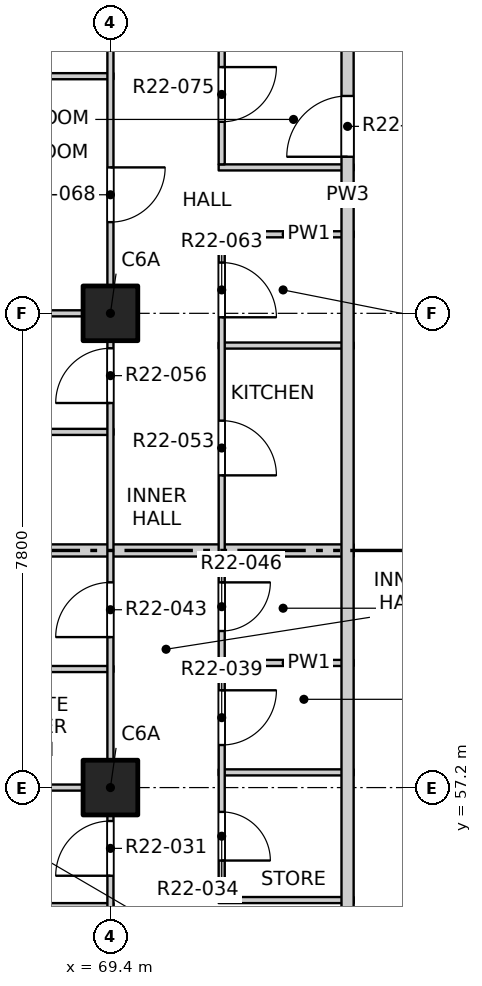
"""IFC4 building model, lengths in metres.
Left out: names, types, materials, properties, quantities, classifications, styles, units other than length and angle.
Written with IfcOpenShell. Run it as: python <this file> out.ifc"""

import sys

from ifc_helpers import new_model, si_unit, direction, frame, frame_2d, origin, origin_2d, place, context, subcontext, project, spatial, rectangle, extrude, element, fill, save


model = new_model("IFC4")
c1 = context("Model", 3, precision=1e-05, world=origin(), true_north=direction((0.0, 1.0)))
c2 = subcontext(c1, "Body", "Model", "MODEL_VIEW")
j1 = project(units=[si_unit("LENGTHUNIT", "METRE"), si_unit("PLANEANGLEUNIT", "RADIAN")], contexts=[c1])
p1 = place(None, origin())
s1 = spatial("IfcSite", under=j1, at=p1, CompositionType="ELEMENT")
p2 = place(p1, origin())
s2 = spatial("IfcBuilding", under=s1, at=p2, CompositionType="ELEMENT")
p3 = place(p2, frame((0.0, 0.0, 231.3)))
s3 = spatial("IfcBuildingStorey", under=s2, at=p3, CompositionType="ELEMENT", Elevation=231.3)
for number, where, z_axis, x_axis in (
    (1, (69.4, 57.2, -0.25), (0.0, 0.0, 1.0), (1.0, 0.0, 0.0)),
    (2, (69.4, 65.0, -0.25), (0.0, 0.0, 1.0), (1.0, 0.0, 0.0)),
):
    element("IfcColumn", number, at=place(p3, frame(where, z_axis=z_axis, x_axis=x_axis)), inside=s3, PredefinedType="COLUMN", context=c2, shape_type="SweptSolid", body=[
        extrude(rectangle(XDim=0.9, YDim=0.9, at=origin_2d()), origin(), (0.0, 0.0, 1.0), 3.4),
    ])
p4 = place(p3, frame((65.9, 55.25, 0.0), z_axis=(0.0, 0.0, 1.0), x_axis=(1.0, 0.0, 0.0)))
e3 = element("IfcWall", 3, at=p4, inside=s3, PredefinedType="PARTITIONING", context=c2, shape_type="SweptSolid", body=[
    extrude(rectangle(XDim=3.55, YDim=0.1, at=frame_2d((1.775, 0.0))), origin(), (0.0, 0.0, 1.0), 3.15),
])
p5 = place(p3, frame((71.18, 55.35, 0.0), z_axis=(0.0, 0.0, 1.0), x_axis=(1.0, 0.0, 0.0)))
e4 = element("IfcWall", 4, at=p5, inside=s3, PredefinedType="PARTITIONING", context=c2, shape_type="SweptSolid", body=[
    extrude(rectangle(XDim=2.22, YDim=0.1, at=frame_2d((1.11, 0.0))), origin(), (0.0, 0.0, 1.0), 3.15),
])
p6 = place(p3, frame((61.9, 57.2, 0.0), z_axis=(0.0, 0.0, 1.0), x_axis=(1.0, 0.0, 0.0)))
e5 = element("IfcWall", 5, at=p6, inside=s3, PredefinedType="PARTITIONING", context=c2, shape_type="SweptSolid", body=[
    extrude(rectangle(XDim=7.55, YDim=0.1, at=frame_2d((3.775, 0.0))), origin(), (0.0, 0.0, 1.0), 3.15),
])
p7 = place(p3, frame((71.18, 57.45, 0.0), z_axis=(0.0, 0.0, 1.0), x_axis=(1.0, 0.0, 0.0)))
e6 = element("IfcWall", 6, at=p7, inside=s3, PredefinedType="PARTITIONING", context=c2, shape_type="SweptSolid", body=[
    extrude(rectangle(XDim=2.22, YDim=0.1, at=frame_2d((1.11, 0.0))), origin(), (0.0, 0.0, 1.0), 3.15),
])
p8 = place(p3, frame((65.9, 59.15, 0.0), z_axis=(0.0, 0.0, 1.0), x_axis=(1.0, 0.0, 0.0)))
e7 = element("IfcWall", 7, at=p8, inside=s3, PredefinedType="PARTITIONING", context=c2, shape_type="SweptSolid", body=[
    extrude(rectangle(XDim=3.55, YDim=0.1, at=frame_2d((1.775, 0.0))), origin(), (0.0, 0.0, 1.0), 3.15),
])
p9 = place(p3, frame((71.18, 59.25, 0.0), z_axis=(0.0, 0.0, 1.0), x_axis=(1.0, 0.0, 0.0)))
e8 = element("IfcWall", 8, at=p9, inside=s3, PredefinedType="PARTITIONING", context=c2, shape_type="SweptSolid", body=[
    extrude(rectangle(XDim=2.22, YDim=0.1, at=frame_2d((1.11, 0.0))), origin(), (0.0, 0.0, 1.0), 3.15),
])
p10 = place(p3, frame((61.9, 61.1, 0.0), z_axis=(0.0, 0.0, 1.0), x_axis=(1.0, 0.0, 0.0)))
e9 = element("IfcWall", 9, at=p10, inside=s3, PredefinedType="PARTITIONING", context=c2, shape_type="SweptSolid", body=[
    extrude(rectangle(XDim=11.5, YDim=0.2, at=frame_2d((5.75, 0.0))), origin(), (0.0, 0.0, 1.0), 2.55),
])
p11 = place(p3, frame((65.75, 63.05, 0.0), z_axis=(0.0, 0.0, 1.0), x_axis=(1.0, 0.0, 0.0)))
e10 = element("IfcWall", 10, at=p11, inside=s3, PredefinedType="PARTITIONING", context=c2, shape_type="SweptSolid", body=[
    extrude(rectangle(XDim=3.7, YDim=0.1, at=frame_2d((1.85, 0.0))), origin(), (0.0, 0.0, 1.0), 3.15),
])
p12 = place(p3, frame((71.18, 64.47, 0.0), z_axis=(0.0, 0.0, 1.0), x_axis=(1.0, 0.0, 0.0)))
e11 = element("IfcWall", 11, at=p12, inside=s3, PredefinedType="PARTITIONING", context=c2, shape_type="SweptSolid", body=[
    extrude(rectangle(XDim=2.22, YDim=0.1, at=frame_2d((1.11, 0.0))), origin(), (0.0, 0.0, 1.0), 3.15),
])
p13 = place(p3, frame((61.9, 65.0, 0.0), z_axis=(0.0, 0.0, 1.0), x_axis=(1.0, 0.0, 0.0)))
e12 = element("IfcWall", 12, at=p13, inside=s3, PredefinedType="PARTITIONING", context=c2, shape_type="SweptSolid", body=[
    extrude(rectangle(XDim=7.55, YDim=0.1, at=frame_2d((3.775, 0.0))), origin(), (0.0, 0.0, 1.0), 3.15),
])
for number, where, z_axis, x_axis in (
    (13, (71.18, 66.3, 0.0), (0.0, 0.0, 1.0), (1.0, 0.0, 0.0)),
    (14, (71.18, 67.4, 0.0), (0.0, 0.0, 1.0), (1.0, 0.0, 0.0)),
):
    element("IfcWall", number, at=place(p3, frame(where, z_axis=z_axis, x_axis=x_axis)), inside=s3, PredefinedType="PARTITIONING", context=c2, shape_type="SweptSolid", body=[
        extrude(rectangle(XDim=2.22, YDim=0.1, at=frame_2d((1.11, 0.0))), origin(), (0.0, 0.0, 1.0), 3.15),
    ])
p14 = place(p3, frame((61.9, 68.9, 0.0), z_axis=(0.0, 0.0, 1.0), x_axis=(1.0, 0.0, 0.0)))
e15 = element("IfcWall", 15, at=p14, inside=s3, PredefinedType="PARTITIONING", context=c2, shape_type="SweptSolid", body=[
    extrude(rectangle(XDim=7.55, YDim=0.1, at=frame_2d((3.775, 0.0))), origin(), (0.0, 0.0, 1.0), 2.55),
])
p15 = place(p3, frame((69.4, 41.9, 0.0), z_axis=(0.0, 0.0, 1.0), x_axis=(0.0, 1.0, 0.0)))
e16 = element("IfcWall", 16, at=p15, inside=s3, PredefinedType="PARTITIONING", context=c2, shape_type="SweptSolid", body=[
    extrude(rectangle(XDim=46.2, YDim=0.1, at=frame_2d((23.1, 0.0))), origin(), (0.0, 0.0, 1.0), 3.15),
])
p16 = place(p15, frame((1.2, 0.0, 0.0)))
e17 = element("IfcOpeningElement", 17, at=p16, cuts=e16, PredefinedType="OPENING", context=c2, shape_type="SweptSolid", body=[
    extrude(rectangle(XDim=0.9, YDim=2.1, at=frame_2d((0.45, 1.05))), frame((0.0, 0.06, 0.0), z_axis=(0.0, -1.0, 0.0), x_axis=(1.0, 0.0, 0.0)), (0.0, 0.0, 1.0), 0.12),
])
p17 = place(p15, frame((5.1, 0.0, 0.0)))
e18 = element("IfcOpeningElement", 18, at=p17, cuts=e16, PredefinedType="OPENING", context=c2, shape_type="SweptSolid", body=[
    extrude(rectangle(XDim=0.9, YDim=2.1, at=frame_2d((0.45, 1.05))), frame((0.0, 0.06, 0.0), z_axis=(0.0, -1.0, 0.0), x_axis=(1.0, 0.0, 0.0)), (0.0, 0.0, 1.0), 0.12),
])
p18 = place(p15, frame((9.0, 0.0, 0.0)))
e19 = element("IfcOpeningElement", 19, at=p18, cuts=e16, PredefinedType="OPENING", context=c2, shape_type="SweptSolid", body=[
    extrude(rectangle(XDim=0.9, YDim=2.1, at=frame_2d((0.45, 1.05))), frame((0.0, 0.06, 0.0), z_axis=(0.0, -1.0, 0.0), x_axis=(1.0, 0.0, 0.0)), (0.0, 0.0, 1.0), 0.12),
])
p19 = place(p15, frame((13.85, 0.0, 0.0)))
e20 = element("IfcOpeningElement", 20, at=p19, cuts=e16, PredefinedType="OPENING", context=c2, shape_type="SweptSolid", body=[
    extrude(rectangle(XDim=0.9, YDim=2.1, at=frame_2d((0.45, 1.05))), frame((0.0, 0.06, 0.0), z_axis=(0.0, -1.0, 0.0), x_axis=(1.0, 0.0, 0.0)), (0.0, 0.0, 1.0), 0.12),
])
p20 = place(p15, frame((17.775, 0.0, 0.0)))
e21 = element("IfcOpeningElement", 21, at=p20, cuts=e16, PredefinedType="OPENING", context=c2, shape_type="SweptSolid", body=[
    extrude(rectangle(XDim=0.9, YDim=2.1, at=frame_2d((0.45, 1.05))), frame((0.0, 0.06, 0.0), z_axis=(0.0, -1.0, 0.0), x_axis=(1.0, 0.0, 0.0)), (0.0, 0.0, 1.0), 0.12),
])
p21 = place(p15, frame((21.625, 0.0, 0.0)))
e22 = element("IfcOpeningElement", 22, at=p21, cuts=e16, PredefinedType="OPENING", context=c2, shape_type="SweptSolid", body=[
    extrude(rectangle(XDim=0.9, YDim=2.1, at=frame_2d((0.45, 1.05))), frame((0.0, 0.06, 0.0), z_axis=(0.0, -1.0, 0.0), x_axis=(1.0, 0.0, 0.0)), (0.0, 0.0, 1.0), 0.12),
])
p22 = place(p15, frame((24.6, 0.0, 0.0)))
e23 = element("IfcOpeningElement", 23, at=p22, cuts=e16, PredefinedType="OPENING", context=c2, shape_type="SweptSolid", body=[
    extrude(rectangle(XDim=0.9, YDim=2.1, at=frame_2d((0.45, 1.05))), frame((0.0, 0.06, 0.0), z_axis=(0.0, -1.0, 0.0), x_axis=(1.0, 0.0, 0.0)), (0.0, 0.0, 1.0), 0.12),
])
p23 = place(p15, frame((29.425, 0.0, 0.0)))
e24 = element("IfcOpeningElement", 24, at=p23, cuts=e16, PredefinedType="OPENING", context=c2, shape_type="SweptSolid", body=[
    extrude(rectangle(XDim=0.9, YDim=2.1, at=frame_2d((0.45, 1.05))), frame((0.0, 0.06, 0.0), z_axis=(0.0, -1.0, 0.0), x_axis=(1.0, 0.0, 0.0)), (0.0, 0.0, 1.0), 0.12),
])
p24 = place(p15, frame((33.375, 0.0, 0.0)))
e25 = element("IfcOpeningElement", 25, at=p24, cuts=e16, PredefinedType="OPENING", context=c2, shape_type="SweptSolid", body=[
    extrude(rectangle(XDim=0.9, YDim=2.1, at=frame_2d((0.45, 1.05))), frame((0.0, 0.06, 0.0), z_axis=(0.0, -1.0, 0.0), x_axis=(1.0, 0.0, 0.0)), (0.0, 0.0, 1.0), 0.12),
])
p25 = place(p15, frame((36.3, 0.0, 0.0)))
e26 = element("IfcOpeningElement", 26, at=p25, cuts=e16, PredefinedType="OPENING", context=c2, shape_type="SweptSolid", body=[
    extrude(rectangle(XDim=0.9, YDim=2.1, at=frame_2d((0.45, 1.05))), frame((0.0, 0.06, 0.0), z_axis=(0.0, -1.0, 0.0), x_axis=(1.0, 0.0, 0.0)), (0.0, 0.0, 1.0), 0.12),
])
p26 = place(p15, frame((41.175, 0.0, 0.0)))
e27 = element("IfcOpeningElement", 27, at=p26, cuts=e16, PredefinedType="OPENING", context=c2, shape_type="SweptSolid", body=[
    extrude(rectangle(XDim=0.9, YDim=2.1, at=frame_2d((0.45, 1.05))), frame((0.0, 0.06, 0.0), z_axis=(0.0, -1.0, 0.0), x_axis=(1.0, 0.0, 0.0)), (0.0, 0.0, 1.0), 0.12),
])
p27 = place(p15, frame((44.1, 0.0, 0.0)))
e28 = element("IfcOpeningElement", 28, at=p27, cuts=e16, PredefinedType="OPENING", context=c2, shape_type="SweptSolid", body=[
    extrude(rectangle(XDim=0.9, YDim=2.1, at=frame_2d((0.45, 1.05))), frame((0.0, 0.06, 0.0), z_axis=(0.0, -1.0, 0.0), x_axis=(1.0, 0.0, 0.0)), (0.0, 0.0, 1.0), 0.12),
])
p28 = place(p3, frame((71.23, 55.4, 0.0), z_axis=(0.0, 0.0, 1.0), x_axis=(0.0, 1.0, 0.0)))
e29 = element("IfcWall", 29, at=p28, inside=s3, PredefinedType="PARTITIONING", context=c2, shape_type="SweptSolid", body=[
    extrude(rectangle(XDim=10.85, YDim=0.1, at=frame_2d((5.425, 0.0))), origin(), (0.0, 0.0, 1.0), 3.15),
])
p29 = place(p28, frame((0.6, 0.0, 0.0)))
e30 = element("IfcOpeningElement", 30, at=p29, cuts=e29, PredefinedType="OPENING", context=c2, shape_type="SweptSolid", body=[
    extrude(rectangle(XDim=0.8, YDim=2.1, at=frame_2d((0.4, 1.05))), frame((0.0, 0.06, 0.0), z_axis=(0.0, -1.0, 0.0), x_axis=(1.0, 0.0, 0.0)), (0.0, 0.0, 1.0), 0.12),
])
p30 = place(p28, frame((2.5, 0.0, 0.0)))
e31 = element("IfcOpeningElement", 31, at=p30, cuts=e29, PredefinedType="OPENING", context=c2, shape_type="SweptSolid", body=[
    extrude(rectangle(XDim=0.9, YDim=2.1, at=frame_2d((0.45, 1.05))), frame((0.0, 0.06, 0.0), z_axis=(0.0, -1.0, 0.0), x_axis=(1.0, 0.0, 0.0)), (0.0, 0.0, 1.0), 0.12),
])
p31 = place(p28, frame((4.375, 0.0, 0.0)))
e32 = element("IfcOpeningElement", 32, at=p31, cuts=e29, PredefinedType="OPENING", context=c2, shape_type="SweptSolid", body=[
    extrude(rectangle(XDim=0.8, YDim=2.1, at=frame_2d((0.4, 1.05))), frame((0.0, 0.06, 0.0), z_axis=(0.0, -1.0, 0.0), x_axis=(1.0, 0.0, 0.0)), (0.0, 0.0, 1.0), 0.12),
])
p32 = place(p28, frame((6.935, 0.0, 0.0)))
e33 = element("IfcOpeningElement", 33, at=p32, cuts=e29, PredefinedType="OPENING", context=c2, shape_type="SweptSolid", body=[
    extrude(rectangle(XDim=0.9, YDim=2.1, at=frame_2d((0.45, 1.05))), frame((0.0, 0.06, 0.0), z_axis=(0.0, -1.0, 0.0), x_axis=(1.0, 0.0, 0.0)), (0.0, 0.0, 1.0), 0.12),
])
p33 = place(p28, frame((9.535, 0.0, 0.0)))
e34 = element("IfcOpeningElement", 34, at=p33, cuts=e29, PredefinedType="OPENING", context=c2, shape_type="SweptSolid", body=[
    extrude(rectangle(XDim=0.9, YDim=2.1, at=frame_2d((0.45, 1.05))), frame((0.0, 0.06, 0.0), z_axis=(0.0, -1.0, 0.0), x_axis=(1.0, 0.0, 0.0)), (0.0, 0.0, 1.0), 0.12),
])
p34 = place(p3, frame((71.23, 67.45, 0.0), z_axis=(0.0, 0.0, 1.0), x_axis=(0.0, 1.0, 0.0)))
e35 = element("IfcWall", 35, at=p34, inside=s3, PredefinedType="PARTITIONING", context=c2, shape_type="SweptSolid", body=[
    extrude(rectangle(XDim=6.9, YDim=0.1, at=frame_2d((3.45, 0.0))), origin(), (0.0, 0.0, 1.0), 3.15),
])
p35 = place(p34, frame((0.7, 0.0, 0.0)))
e36 = element("IfcOpeningElement", 36, at=p35, cuts=e35, PredefinedType="OPENING", context=c2, shape_type="SweptSolid", body=[
    extrude(rectangle(XDim=0.9, YDim=2.1, at=frame_2d((0.45, 1.05))), frame((0.0, 0.06, 0.0), z_axis=(0.0, -1.0, 0.0), x_axis=(1.0, 0.0, 0.0)), (0.0, 0.0, 1.0), 0.12),
])
p36 = place(p34, frame((3.45, 0.0, 0.0)))
e37 = element("IfcOpeningElement", 37, at=p36, cuts=e35, PredefinedType="OPENING", context=c2, shape_type="SweptSolid", body=[
    extrude(rectangle(XDim=0.8, YDim=2.1, at=frame_2d((0.4, 1.05))), frame((0.0, 0.06, 0.0), z_axis=(0.0, -1.0, 0.0), x_axis=(1.0, 0.0, 0.0)), (0.0, 0.0, 1.0), 0.12),
])
p37 = place(p34, frame((5.7, 0.0, 0.0)))
e38 = element("IfcOpeningElement", 38, at=p37, cuts=e35, PredefinedType="OPENING", context=c2, shape_type="SweptSolid", body=[
    extrude(rectangle(XDim=0.9, YDim=2.1, at=frame_2d((0.45, 1.05))), frame((0.0, 0.06, 0.0), z_axis=(0.0, -1.0, 0.0), x_axis=(1.0, 0.0, 0.0)), (0.0, 0.0, 1.0), 0.12),
])
p38 = place(p3, frame((73.3, 49.5, 0.0), z_axis=(0.0, 0.0, 1.0), x_axis=(0.0, 1.0, 0.0)))
e39 = element("IfcWall", 39, at=p38, inside=s3, PredefinedType="PARTITIONING", context=c2, shape_type="SweptSolid", body=[
    extrude(rectangle(XDim=34.9, YDim=0.2, at=frame_2d((17.45, 0.0))), origin(), (0.0, 0.0, 1.0), 3.15),
])
p39 = place(p38, frame((3.575, 0.0, 0.0)))
e40 = element("IfcOpeningElement", 40, at=p39, cuts=e39, PredefinedType="OPENING", context=c2, shape_type="SweptSolid", body=[
    extrude(rectangle(XDim=1.0, YDim=2.1, at=frame_2d((0.5, 1.05))), frame((0.0, 0.11, 0.0), z_axis=(0.0, -1.0, 0.0), x_axis=(1.0, 0.0, 0.0)), (0.0, 0.0, 1.0), 0.22),
])
p40 = place(p38, frame((18.075, 0.0, 0.0)))
e41 = element("IfcOpeningElement", 41, at=p40, cuts=e39, PredefinedType="OPENING", context=c2, shape_type="SweptSolid", body=[
    extrude(rectangle(XDim=1.0, YDim=2.1, at=frame_2d((0.5, 1.05))), frame((0.0, 0.11, 0.0), z_axis=(0.0, -1.0, 0.0), x_axis=(1.0, 0.0, 0.0)), (0.0, 0.0, 1.0), 0.22),
])
p41 = place(p38, frame((26.175, 0.0, 0.0)))
e42 = element("IfcOpeningElement", 42, at=p41, cuts=e39, PredefinedType="OPENING", context=c2, shape_type="SweptSolid", body=[
    extrude(rectangle(XDim=1.0, YDim=2.1, at=frame_2d((0.5, 1.05))), frame((0.0, 0.11, 0.0), z_axis=(0.0, -1.0, 0.0), x_axis=(1.0, 0.0, 0.0)), (0.0, 0.0, 1.0), 0.22),
])
p42 = place(p19, origin())
e43 = element("IfcDoor", 43, at=p42, inside=s3, OperationType="SINGLE_SWING_LEFT", PredefinedType="DOOR", context=c2, shape_type="SweptSolid", body=[
    extrude(rectangle(XDim=0.9, YDim=2.1, at=frame_2d((0.45, 1.05))), frame((0.0, 0.025, 0.0), z_axis=(0.0, -1.0, 0.0), x_axis=(1.0, 0.0, 0.0)), (0.0, 0.0, 1.0), 0.05),
])
fill(e20, e43)
p43 = place(p29, origin())
e44 = element("IfcDoor", 44, at=p43, inside=s3, OperationType="SINGLE_SWING_RIGHT", PredefinedType="DOOR", context=c2, shape_type="SweptSolid", body=[
    extrude(rectangle(XDim=0.8, YDim=2.1, at=frame_2d((0.4, 1.05))), frame((0.0, 0.025, 0.0), z_axis=(0.0, -1.0, 0.0), x_axis=(1.0, 0.0, 0.0)), (0.0, 0.0, 1.0), 0.05),
])
fill(e30, e44)
p44 = place(p30, origin())
e45 = element("IfcDoor", 45, at=p44, inside=s3, OperationType="SINGLE_SWING_LEFT", PredefinedType="DOOR", context=c2, shape_type="SweptSolid", body=[
    extrude(rectangle(XDim=0.9, YDim=2.1, at=frame_2d((0.45, 1.05))), frame((0.0, 0.025, 0.0), z_axis=(0.0, -1.0, 0.0), x_axis=(1.0, 0.0, 0.0)), (0.0, 0.0, 1.0), 0.05),
])
fill(e31, e45)
p45 = place(p20, origin())
e46 = element("IfcDoor", 46, at=p45, inside=s3, OperationType="SINGLE_SWING_LEFT", PredefinedType="DOOR", context=c2, shape_type="SweptSolid", body=[
    extrude(rectangle(XDim=0.9, YDim=2.1, at=frame_2d((0.45, 1.05))), frame((0.0, 0.025, 0.0), z_axis=(0.0, -1.0, 0.0), x_axis=(1.0, 0.0, 0.0)), (0.0, 0.0, 1.0), 0.05),
])
fill(e21, e46)
p46 = place(p31, origin())
e47 = element("IfcDoor", 47, at=p46, inside=s3, OperationType="SINGLE_SWING_LEFT", PredefinedType="DOOR", context=c2, shape_type="SweptSolid", body=[
    extrude(rectangle(XDim=0.8, YDim=2.1, at=frame_2d((0.4, 1.05))), frame((0.0, 0.025, 0.0), z_axis=(0.0, -1.0, 0.0), x_axis=(1.0, 0.0, 0.0)), (0.0, 0.0, 1.0), 0.05),
])
fill(e32, e47)
p47 = place(p32, origin())
e48 = element("IfcDoor", 48, at=p47, inside=s3, OperationType="SINGLE_SWING_RIGHT", PredefinedType="DOOR", context=c2, shape_type="SweptSolid", body=[
    extrude(rectangle(XDim=0.9, YDim=2.1, at=frame_2d((0.45, 1.05))), frame((0.0, 0.025, 0.0), z_axis=(0.0, -1.0, 0.0), x_axis=(1.0, 0.0, 0.0)), (0.0, 0.0, 1.0), 0.05),
])
fill(e33, e48)
p48 = place(p21, origin())
e49 = element("IfcDoor", 49, at=p48, inside=s3, OperationType="SINGLE_SWING_LEFT", PredefinedType="DOOR", context=c2, shape_type="SweptSolid", body=[
    extrude(rectangle(XDim=0.9, YDim=2.1, at=frame_2d((0.45, 1.05))), frame((0.0, 0.025, 0.0), z_axis=(0.0, -1.0, 0.0), x_axis=(1.0, 0.0, 0.0)), (0.0, 0.0, 1.0), 0.05),
])
fill(e22, e49)
p49 = place(p33, origin())
e50 = element("IfcDoor", 50, at=p49, inside=s3, OperationType="SINGLE_SWING_RIGHT", PredefinedType="DOOR", context=c2, shape_type="SweptSolid", body=[
    extrude(rectangle(XDim=0.9, YDim=2.1, at=frame_2d((0.45, 1.05))), frame((0.0, 0.025, 0.0), z_axis=(0.0, -1.0, 0.0), x_axis=(1.0, 0.0, 0.0)), (0.0, 0.0, 1.0), 0.05),
])
fill(e34, e50)
p50 = place(p22, origin())
e51 = element("IfcDoor", 51, at=p50, inside=s3, OperationType="SINGLE_SWING_LEFT", PredefinedType="DOOR", context=c2, shape_type="SweptSolid", body=[
    extrude(rectangle(XDim=0.9, YDim=2.1, at=frame_2d((0.45, 1.05))), frame((0.0, 0.025, 0.0), z_axis=(0.0, -1.0, 0.0), x_axis=(1.0, 0.0, 0.0)), (0.0, 0.0, 1.0), 0.05),
])
fill(e23, e51)
p51 = place(p40, origin())
e52 = element("IfcDoor", 52, at=p51, inside=s3, OperationType="SINGLE_SWING_RIGHT", PredefinedType="DOOR", context=c2, shape_type="SweptSolid", body=[
    extrude(rectangle(XDim=1.0, YDim=2.1, at=frame_2d((0.5, 1.05))), frame((0.0, 0.025, 0.0), z_axis=(0.0, -1.0, 0.0), x_axis=(1.0, 0.0, 0.0)), (0.0, 0.0, 1.0), 0.05),
])
fill(e41, e52)
p52 = place(p35, origin())
e53 = element("IfcDoor", 53, at=p52, inside=s3, OperationType="SINGLE_SWING_LEFT", PredefinedType="DOOR", context=c2, shape_type="SweptSolid", body=[
    extrude(rectangle(XDim=0.9, YDim=2.1, at=frame_2d((0.45, 1.05))), frame((0.0, 0.025, 0.0), z_axis=(0.0, -1.0, 0.0), x_axis=(1.0, 0.0, 0.0)), (0.0, 0.0, 1.0), 0.05),
])
fill(e36, e53)
save(model, sys.argv[1])
